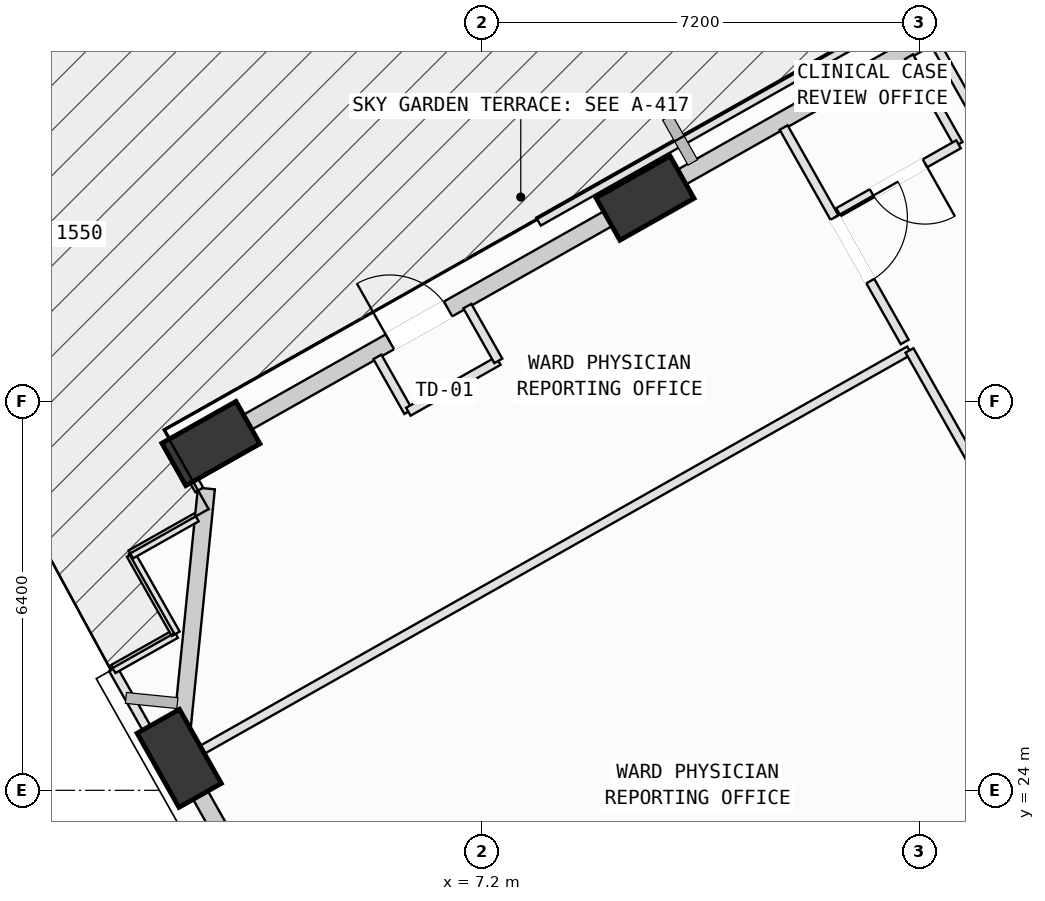
"""IFC4 building model, lengths in metres.
Left out: names, types, materials, properties, quantities, classifications, styles, units other than length and angle.
Written with IfcOpenShell. Run it as: python <this file> out.ifc"""

import sys

from ifc_helpers import new_model, si_unit, direction, frame, frame_2d, origin, origin_2d, place, context, subcontext, project, spatial, rectangle, extrude, element, fill, save


model = new_model("IFC4")
c1 = context("Model", 3, precision=1e-05, world=origin(), true_north=direction((0.0, 1.0)))
c2 = subcontext(c1, "Body", "Model", "MODEL_VIEW")
j1 = project(units=[si_unit("LENGTHUNIT", "METRE"), si_unit("PLANEANGLEUNIT", "RADIAN")], contexts=[c1])
p1 = place(None, origin())
s1 = spatial("IfcSite", under=j1, at=p1, CompositionType="ELEMENT")
p2 = place(p1, origin())
s2 = spatial("IfcBuilding", under=s1, at=p2, CompositionType="ELEMENT")
p3 = place(p2, frame((0.0, 0.0, 149.8)))
s3 = spatial("IfcBuildingStorey", under=s2, at=p3, CompositionType="ELEMENT", Elevation=149.8)
p4 = place(p3, frame((9.884, 33.74, 0.075), z_axis=(-0.036080308129, -0.098029516425, 0.994529248074), x_axis=(0.986085311724, 0.15810776909, 0.051358459426)))
e1 = element("IfcColumn", 1, at=p4, inside=s3, PredefinedType="COLUMN", context=c2, shape_type="SweptSolid", body=[
    extrude(rectangle(XDim=1.4, YDim=0.8, at=origin_2d()), origin(), (0.0, 0.0, 1.0), 3.945),
])
p5 = place(p3, frame((2.745, 29.704, 0.091), z_axis=(-0.019150191055, -0.126986218353, 0.991719602776), x_axis=(0.933758447221, 0.352290278892, 0.063140491291)))
e2 = element("IfcColumn", 2, at=p5, inside=s3, PredefinedType="COLUMN", context=c2, shape_type="SweptSolid", body=[
    extrude(rectangle(XDim=1.4, YDim=0.8, at=origin_2d()), origin(), (0.0, 0.0, 1.0), 3.939),
])
p6 = place(p3, frame((2.224, 24.526, 0.106), z_axis=(0.002115181882, -0.128963883582, 0.991647035359), x_axis=(-0.505758577121, 0.855332460621, 0.112314929893)))
e3 = element("IfcColumn", 3, at=p6, inside=s3, PredefinedType="COLUMN", context=c2, shape_type="SweptSolid", body=[
    extrude(rectangle(XDim=1.4, YDim=0.8, at=origin_2d()), origin(), (0.0, 0.0, 1.0), 3.924),
])
p7 = place(p3, frame((10.163, 33.903, 0.0), z_axis=(0.0, 0.0, 1.0), x_axis=(0.87077907775, 0.491674483528, 0.0)))
e4 = element("IfcWall", 4, at=p7, inside=s3, PredefinedType="SOLIDWALL", context=c2, shape_type="SweptSolid", body=[
    extrude(rectangle(XDim=7.231, YDim=0.28, at=frame_2d((3.615, 0.0))), origin(), (0.0, 0.0, 1.0), 3.165),
])
p8 = place(p3, frame((3.001, 29.86, 0.0), z_axis=(0.0, 0.0, 1.0), x_axis=(0.87078604554, 0.491662143033, 0.0)))
e5 = element("IfcWall", 5, at=p8, inside=s3, PredefinedType="SOLIDWALL", context=c2, shape_type="SweptSolid", body=[
    extrude(rectangle(XDim=7.27, YDim=0.28, at=frame_2d((3.635, 0.0))), origin(), (0.0, 0.0, 1.0), 3.165),
])
p9 = place(p8, frame((3.085, 0.0, 0.0)))
e6 = element("IfcOpeningElement", 6, at=p9, cuts=e5, PredefinedType="OPENING", context=c2, shape_type="SweptSolid", body=[
    extrude(rectangle(XDim=1.1, YDim=2.15, at=frame_2d((0.55, 1.075))), frame((0.0, 0.15, 0.0), z_axis=(0.0, -1.0, 0.0), x_axis=(1.0, 0.0, 0.0)), (0.0, 0.0, 1.0), 0.3),
])
p10 = place(p3, frame((2.248, 24.775, 0.0), z_axis=(0.0, 0.0, 1.0), x_axis=(0.100485371099, 0.994938535888, 0.0)))
e7 = element("IfcWall", 7, at=p10, inside=s3, PredefinedType="SOLIDWALL", context=c2, shape_type="SweptSolid", body=[
    extrude(rectangle(XDim=4.21, YDim=0.28, at=frame_2d((2.105, 0.0))), origin(), (0.0, 0.0, 1.0), 3.165),
])
p11 = place(p3, frame((5.339, 19.022, 0.0), z_axis=(0.0, 0.0, 1.0), x_axis=(-0.49164265264, 0.870797049894, 0.0)))
e8 = element("IfcWall", 8, at=p11, inside=s3, PredefinedType="SOLIDWALL", context=c2, shape_type="SweptSolid", body=[
    extrude(rectangle(XDim=5.628, YDim=0.28, at=frame_2d((2.814, 0.0))), origin(), (0.0, 0.0, 1.0), 3.165),
])
p12 = place(p11, frame((1.811, 0.0, 0.75)))
e9 = element("IfcOpeningElement", 9, at=p12, cuts=e8, PredefinedType="OPENING", context=c2, shape_type="SweptSolid", body=[
    extrude(rectangle(XDim=2.0, YDim=1.95, at=frame_2d((1.0, 0.975))), frame((0.0, 0.15, 0.0), z_axis=(0.0, -1.0, 0.0), x_axis=(1.0, 0.0, 0.0)), (0.0, 0.0, 1.0), 0.3),
])
p13 = place(p3, frame((2.06, 24.361, 0.0), z_axis=(0.0, 0.0, 1.0), x_axis=(0.870772215096, 0.491686637419, 0.0)))
e10 = element("IfcWall", 10, at=p13, inside=s3, PredefinedType="PARTITIONING", context=c2, shape_type="SweptSolid", body=[
    extrude(rectangle(XDim=13.98, YDim=0.15, at=frame_2d((6.99, 0.0))), origin(), (0.0, 0.0, 1.0), 3.78),
])
p14 = place(p3, frame((14.234, 31.235, 0.0), z_axis=(0.0, 0.0, 1.0), x_axis=(0.491609563099, -0.870815731065, 0.0)))
e11 = element("IfcWall", 11, at=p14, inside=s3, PredefinedType="PARTITIONING", context=c2, shape_type="SweptSolid", body=[
    extrude(rectangle(XDim=9.04, YDim=0.15, at=frame_2d((4.52, 0.0))), origin(), (0.0, 0.0, 1.0), 3.78),
])
p15 = place(p14, frame((3.92, 0.0, 0.0)))
e12 = element("IfcOpeningElement", 12, at=p15, cuts=e11, PredefinedType="OPENING", context=c2, shape_type="SweptSolid", body=[
    extrude(rectangle(XDim=1.2, YDim=2.15, at=frame_2d((0.6, 1.075))), frame((0.0, 0.085, 0.0), z_axis=(0.0, -1.0, 0.0), x_axis=(1.0, 0.0, 0.0)), (0.0, 0.0, 1.0), 0.17),
])
p16 = place(p3, frame((2.372, 23.809, 0.0), z_axis=(0.0, 0.0, 1.0), x_axis=(-0.492069943892, 0.870555667558, 0.0)))
e13 = element("IfcWall", 13, at=p16, inside=s3, PredefinedType="PARTITIONING", context=c2, shape_type="SweptSolid", body=[
    extrude(rectangle(XDim=0.634, YDim=0.15, at=frame_2d((0.317, 0.0))), origin(), (0.0, 0.0, 1.0), 3.165),
])
p17 = place(p3, frame((2.553, 28.941, 0.0), z_axis=(0.0, 0.0, 1.0), x_axis=(-0.492379351397, 0.87038070654, 0.0)))
e14 = element("IfcWall", 14, at=p17, inside=s3, PredefinedType="PARTITIONING", context=c2, shape_type="SweptSolid", body=[
    extrude(rectangle(XDim=0.749, YDim=0.15, at=frame_2d((0.375, 0.0))), origin(), (0.0, 0.0, 1.0), 2.765),
])
p18 = place(p3, frame((2.184, 29.593, 0.0), z_axis=(0.0, 0.0, 1.0), x_axis=(0.870940315607, 0.491388814128, 0.0)))
e15 = element("IfcWall", 15, at=p18, inside=s3, PredefinedType="PARTITIONING", context=c2, shape_type="SweptSolid", body=[
    extrude(rectangle(XDim=0.843, YDim=0.15, at=frame_2d((0.421, 0.0))), origin(), (0.0, 0.0, 1.0), 3.78),
])
p19 = place(p3, frame((5.483, 31.129, 0.0), z_axis=(0.0, 0.0, 1.0), x_axis=(0.491536697049, -0.870856862782, 0.0)))
e16 = element("IfcWall", 16, at=p19, inside=s3, PredefinedType="PARTITIONING", context=c2, shape_type="SweptSolid", body=[
    extrude(rectangle(XDim=1.036, YDim=0.15, at=frame_2d((0.518, 0.0))), origin(), (0.0, 0.0, 1.0), 3.78),
])
p20 = place(p3, frame((5.992, 30.227, 0.0), z_axis=(0.0, 0.0, 1.0), x_axis=(0.870707257982, 0.491801658088, 0.0)))
e17 = element("IfcWall", 17, at=p20, inside=s3, PredefinedType="PARTITIONING", context=c2, shape_type="SweptSolid", body=[
    extrude(rectangle(XDim=1.7, YDim=0.15, at=frame_2d((0.85, 0.0))), origin(), (0.0, 0.0, 1.0), 3.78),
])
p21 = place(p3, frame((7.472, 31.063, 0.0), z_axis=(0.0, 0.0, 1.0), x_axis=(-0.491839596701, 0.870685828021, 0.0)))
e18 = element("IfcWall", 18, at=p21, inside=s3, PredefinedType="PARTITIONING", context=c2, shape_type="SweptSolid", body=[
    extrude(rectangle(XDim=1.035, YDim=0.15, at=frame_2d((0.518, 0.0))), origin(), (0.0, 0.0, 1.0), 3.78),
])
p22 = place(p3, frame((9.248, 33.582, 0.0), z_axis=(0.0, 0.0, 1.0), x_axis=(0.870891428994, 0.491475450969, 0.0)))
e19 = element("IfcWall", 19, at=p22, inside=s3, PredefinedType="PARTITIONING", context=c2, shape_type="SweptSolid", body=[
    extrude(rectangle(XDim=0.954, YDim=0.15, at=frame_2d((0.477, 0.0))), origin(), (0.0, 0.0, 1.0), 3.78),
])
p23 = place(p3, frame((12.164, 34.901, 0.0), z_axis=(0.0, 0.0, 1.0), x_axis=(0.491594368038, -0.870824309096, 0.0)))
e20 = element("IfcWall", 20, at=p23, inside=s3, PredefinedType="PARTITIONING", context=c2, shape_type="SweptSolid", body=[
    extrude(rectangle(XDim=4.05, YDim=0.15, at=frame_2d((2.025, 0.0))), origin(), (0.0, 0.0, 1.0), 3.78),
])
p24 = place(p23, frame((1.7, 0.0, 0.0)))
e21 = element("IfcOpeningElement", 21, at=p24, cuts=e20, PredefinedType="OPENING", context=c2, shape_type="SweptSolid", body=[
    extrude(rectangle(XDim=1.2, YDim=2.15, at=frame_2d((0.6, 1.075))), frame((0.0, 0.085, 0.0), z_axis=(0.0, -1.0, 0.0), x_axis=(1.0, 0.0, 0.0)), (0.0, 0.0, 1.0), 0.17),
])
p25 = place(p3, frame((1.982, 24.501, 0.0), z_axis=(0.0, 0.0, 1.0), x_axis=(-0.492132309021, 0.870520413556, 0.0)))
e22 = element("IfcWall", 22, at=p25, inside=s3, PredefinedType="PARTITIONING", context=c2, shape_type="SweptSolid", body=[
    extrude(rectangle(XDim=1.715, YDim=0.15, at=frame_2d((0.857, 0.0))), origin(), (0.0, 0.0, 1.0), 3.78),
])
p26 = place(p3, frame((1.138, 25.994, 0.0), z_axis=(0.0, 0.0, 1.0), x_axis=(0.870928537075, 0.491409689881, 0.0)))
e23 = element("IfcWall", 23, at=p26, inside=s3, PredefinedType="PARTITIONING", context=c2, shape_type="SweptSolid", body=[
    extrude(rectangle(XDim=1.18, YDim=0.15, at=frame_2d((0.59, 0.0))), origin(), (0.0, 0.0, 1.0), 3.78),
])
p27 = place(p3, frame((2.166, 26.574, 0.0), z_axis=(0.0, 0.0, 1.0), x_axis=(-0.492014351651, 0.870587087987, 0.0)))
e24 = element("IfcWall", 24, at=p27, inside=s3, PredefinedType="PARTITIONING", context=c2, shape_type="SweptSolid", body=[
    extrude(rectangle(XDim=1.5, YDim=0.15, at=frame_2d((0.75, 0.0))), origin(), (0.0, 0.0, 1.0), 3.78),
])
p28 = place(p3, frame((1.428, 27.88, 0.0), z_axis=(0.0, 0.0, 1.0), x_axis=(0.870837912581, 0.491570269658, 0.0)))
e25 = element("IfcWall", 25, at=p28, inside=s3, PredefinedType="PARTITIONING", context=c2, shape_type="SweptSolid", body=[
    extrude(rectangle(XDim=1.239, YDim=0.15, at=frame_2d((0.62, 0.0))), origin(), (0.0, 0.0, 1.0), 3.78),
])
p29 = place(p3, frame((17.19, 31.796, 0.0), z_axis=(0.0, 0.0, 1.0), x_axis=(-0.49162033615, 0.870809649168, 0.0)))
e26 = element("IfcWall", 26, at=p29, inside=s3, PredefinedType="PARTITIONING", context=c2, shape_type="SweptSolid", body=[
    extrude(rectangle(XDim=5.175, YDim=0.15, at=frame_2d((2.587, 0.0))), origin(), (0.0, 0.0, 1.0), 3.78),
])
p30 = place(p29, frame((2.127, 0.0, 0.0)))
e27 = element("IfcOpeningElement", 27, at=p30, cuts=e26, PredefinedType="OPENING", context=c2, shape_type="SweptSolid", body=[
    extrude(rectangle(XDim=0.92, YDim=2.1, at=frame_2d((0.46, 1.05))), frame((0.0, 0.085, 0.0), z_axis=(0.0, -1.0, 0.0), x_axis=(1.0, 0.0, 0.0)), (0.0, 0.0, 1.0), 0.17),
])
p31 = place(p3, frame((8.133, 33.354, 0.0), z_axis=(0.0, 0.0, 1.0), x_axis=(0.870768198127, 0.491693751364, 0.0)))
e28 = element("IfcWall", 28, at=p31, inside=s3, PredefinedType="PARTITIONING", context=c2, shape_type="SweptSolid", body=[
    extrude(rectangle(XDim=6.64, YDim=0.15, at=frame_2d((3.32, 0.0))), origin(), (0.0, 0.0, 1.0), 3.78),
])
p32 = place(p3, frame((14.227, 36.066, 0.0), z_axis=(0.0, 0.0, 1.0), x_axis=(0.491843353875, -0.87068370563, 0.0)))
e29 = element("IfcWall", 29, at=p32, inside=s3, PredefinedType="PARTITIONING", context=c2, shape_type="SweptSolid", body=[
    extrude(rectangle(XDim=1.655, YDim=0.15, at=frame_2d((0.828, 0.0))), origin(), (0.0, 0.0, 1.0), 3.78),
])
p33 = place(p3, frame((15.041, 34.625, 0.0), z_axis=(0.0, 0.0, 1.0), x_axis=(-0.870741103083, -0.491741732418, 0.0)))
e30 = element("IfcWall", 30, at=p33, inside=s3, PredefinedType="PARTITIONING", context=c2, shape_type="SweptSolid", body=[
    extrude(rectangle(XDim=2.27, YDim=0.15, at=frame_2d((1.135, 0.0))), origin(), (0.0, 0.0, 1.0), 3.78),
])
p34 = place(p33, frame((0.635, 0.0, 0.0)))
e31 = element("IfcOpeningElement", 31, at=p34, cuts=e30, PredefinedType="OPENING", context=c2, shape_type="SweptSolid", body=[
    extrude(rectangle(XDim=1.0, YDim=2.12, at=frame_2d((0.5, 1.06))), frame((0.0, 0.085, 0.0), z_axis=(0.0, -1.0, 0.0), x_axis=(1.0, 0.0, 0.0)), (0.0, 0.0, 1.0), 0.17),
])
p35 = place(p9, origin())
e32 = element("IfcDoor", 32, at=p35, inside=s3, OperationType="SINGLE_SWING_LEFT", PredefinedType="DOOR", context=c2, shape_type="SweptSolid", body=[
    extrude(rectangle(XDim=1.1, YDim=2.15, at=frame_2d((0.55, 1.075))), frame((0.0, 0.025, 0.0), z_axis=(0.0, -1.0, 0.0), x_axis=(1.0, 0.0, 0.0)), (0.0, 0.0, 1.0), 0.05),
])
fill(e6, e32)
p36 = place(p24, origin())
e33 = element("IfcDoor", 33, at=p36, inside=s3, OperationType="SINGLE_SWING_LEFT", PredefinedType="DOOR", context=c2, shape_type="SweptSolid", body=[
    extrude(rectangle(XDim=1.2, YDim=2.15, at=frame_2d((0.6, 1.075))), frame((0.0, 0.025, 0.0), z_axis=(0.0, -1.0, 0.0), x_axis=(1.0, 0.0, 0.0)), (0.0, 0.0, 1.0), 0.05),
])
fill(e21, e33)
p37 = place(p34, origin())
e34 = element("IfcDoor", 34, at=p37, inside=s3, OperationType="SINGLE_SWING_LEFT", PredefinedType="DOOR", context=c2, shape_type="SweptSolid", body=[
    extrude(rectangle(XDim=1.0, YDim=2.12, at=frame_2d((0.5, 1.06))), frame((0.0, 0.025, 0.0), z_axis=(0.0, -1.0, 0.0), x_axis=(1.0, 0.0, 0.0)), (0.0, 0.0, 1.0), 0.05),
])
fill(e31, e34)
save(model, sys.argv[1])
